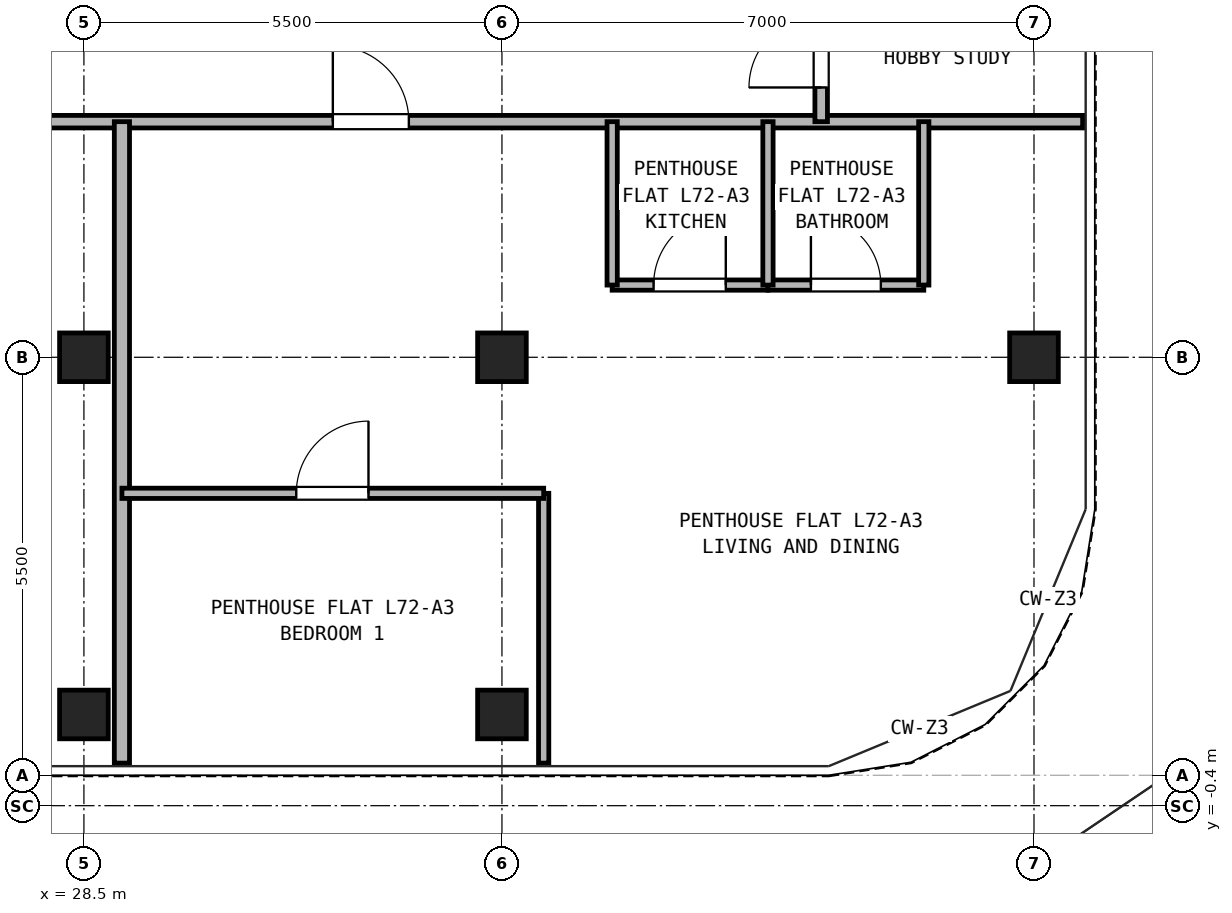
"""IFC4 building model, lengths in metres.
Left out: names, types, materials, properties, quantities, classifications, styles, units other than length and angle.
Written with IfcOpenShell. Run it as: python <this file> out.ifc"""

import sys

from ifc_helpers import new_model, si_unit, direction, frame, frame_2d, origin, origin_2d, place, context, subcontext, project, spatial, rectangle, hollow_rectangle, extrude, source, transform, mapped, element, fill, save


model = new_model("IFC4")
c1 = context("Model", 3, precision=1e-05, world=origin(), true_north=direction((0.0, 1.0)))
c2 = subcontext(c1, "Body", "Model", "MODEL_VIEW")
j1 = project(units=[si_unit("LENGTHUNIT", "METRE"), si_unit("PLANEANGLEUNIT", "RADIAN")], contexts=[c1])
p1 = place(None, origin())
s1 = spatial("IfcSite", under=j1, at=p1, CompositionType="ELEMENT")
p2 = place(p1, origin())
s2 = spatial("IfcBuilding", under=s1, at=p2, CompositionType="ELEMENT")
p3 = place(p2, frame((0.0, 0.0, 252.1)))
s3 = spatial("IfcBuildingStorey", under=s2, at=p3, CompositionType="ELEMENT", Elevation=252.1)
m1 = source(origin(), c2, "Body", "SweptSolid", [
    extrude(hollow_rectangle(XDim=0.64, YDim=0.64, WallThickness=0.035, at=origin_2d()), origin(), (0.0, 0.0, 1.0), 2.98),
])
for number, where, z_axis, x_axis in (
    (1, (28.5, 0.8, 0.0), (0.0, 0.0, 1.0), (1.0, 0.0, 0.0)),
    (2, (34.0, 0.8, 0.0), (0.0, 0.0, 1.0), (1.0, 0.0, 0.0)),
    (3, (41.0, 5.5, 0.0), (0.0, 0.0, 1.0), (1.0, 0.0, 0.0)),
    (4, (28.5, 5.5, 0.0), (0.0, 0.0, 1.0), (1.0, 0.0, 0.0)),
    (5, (34.0, 5.5, 0.0), (0.0, 0.0, 1.0), (1.0, 0.0, 0.0)),
):
    element("IfcColumn", number, at=place(p3, frame(where, z_axis=z_axis, x_axis=x_axis)), inside=s3, PredefinedType="COLUMN", context=c2, shape_type="MappedRepresentation", body=[
        mapped(m1, transform((0.0, 0.0, 0.0), x_axis=(1.0, 0.0, 0.0), y_axis=(0.0, 1.0, 0.0), z_axis=(0.0, 0.0, 1.0), scale=1.0)),
    ])
p4 = place(p3, frame((5.36, 8.6, 0.0), z_axis=(0.0, 0.0, 1.0), x_axis=(1.0, 0.0, 0.0)))
e6 = element("IfcWall", 6, at=p4, inside=s3, PredefinedType="PARTITIONING", context=c2, shape_type="SweptSolid", body=[
    extrude(rectangle(XDim=36.28, YDim=0.165, at=frame_2d((18.14, 0.0))), origin(), (0.0, 0.0, 1.0), 2.655),
])
p5 = place(p4, frame((8.365, 0.0, 0.0)))
e7 = element("IfcOpeningElement", 7, at=p5, cuts=e6, PredefinedType="OPENING", context=c2, shape_type="SweptSolid", body=[
    extrude(rectangle(XDim=1.0, YDim=2.15, at=frame_2d((0.5, 1.075))), frame((0.0, 0.093, 0.0), z_axis=(0.0, -1.0, 0.0), x_axis=(1.0, 0.0, 0.0)), (0.0, 0.0, 1.0), 0.185),
])
p6 = place(p4, frame((14.165, 0.0, 0.0)))
e8 = element("IfcOpeningElement", 8, at=p6, cuts=e6, PredefinedType="OPENING", context=c2, shape_type="SweptSolid", body=[
    extrude(rectangle(XDim=1.0, YDim=2.15, at=frame_2d((0.5, 1.075))), frame((0.0, 0.093, 0.0), z_axis=(0.0, -1.0, 0.0), x_axis=(1.0, 0.0, 0.0)), (0.0, 0.0, 1.0), 0.185),
])
p7 = place(p4, frame((26.415, 0.0, 0.0)))
e9 = element("IfcOpeningElement", 9, at=p7, cuts=e6, PredefinedType="OPENING", context=c2, shape_type="SweptSolid", body=[
    extrude(rectangle(XDim=1.0, YDim=2.15, at=frame_2d((0.5, 1.075))), frame((0.0, 0.093, 0.0), z_axis=(0.0, -1.0, 0.0), x_axis=(1.0, 0.0, 0.0)), (0.0, 0.0, 1.0), 0.185),
])
p8 = place(p3, frame((38.2, 8.6, 0.0), z_axis=(0.0, 0.0, 1.0), x_axis=(0.0, 1.0, 0.0)))
e10 = element("IfcWall", 10, at=p8, inside=s3, PredefinedType="PARTITIONING", context=c2, shape_type="SweptSolid", body=[
    extrude(rectangle(XDim=2.0, YDim=0.165, at=frame_2d((1.0, 0.0))), origin(), (0.0, 0.0, 1.0), 2.98),
])
p9 = place(p8, frame((0.45, 0.0, 0.0)))
e11 = element("IfcOpeningElement", 11, at=p9, cuts=e10, PredefinedType="OPENING", context=c2, shape_type="SweptSolid", body=[
    extrude(rectangle(XDim=0.95, YDim=2.15, at=frame_2d((0.475, 1.075))), frame((0.0, 0.093, 0.0), z_axis=(0.0, -1.0, 0.0), x_axis=(1.0, 0.0, 0.0)), (0.0, 0.0, 1.0), 0.185),
])
p10 = place(p3, frame((29.0, 0.16, 0.0), z_axis=(0.0, 0.0, 1.0), x_axis=(0.0, 1.0, 0.0)))
e12 = element("IfcWall", 12, at=p10, inside=s3, PredefinedType="PARTITIONING", context=c2, shape_type="SweptSolid", body=[
    extrude(rectangle(XDim=8.44, YDim=0.2, at=frame_2d((4.22, 0.0))), origin(), (0.0, 0.0, 1.0), 2.98),
])
p11 = place(p3, frame((35.45, 6.45, 0.0), z_axis=(0.0, 0.0, 1.0), x_axis=(1.0, 0.0, 0.0)))
e13 = element("IfcWall", 13, at=p11, inside=s3, PredefinedType="PARTITIONING", context=c2, shape_type="SweptSolid", body=[
    extrude(rectangle(XDim=2.05, YDim=0.135, at=frame_2d((1.025, 0.0))), origin(), (0.0, 0.0, 1.0), 2.98),
])
p12 = place(p11, frame((0.545, 0.0, 0.0)))
e14 = element("IfcOpeningElement", 14, at=p12, cuts=e13, PredefinedType="OPENING", context=c2, shape_type="SweptSolid", body=[
    extrude(rectangle(XDim=0.95, YDim=2.15, at=frame_2d((0.475, 1.075))), frame((0.0, 0.077, 0.0), z_axis=(0.0, -1.0, 0.0), x_axis=(1.0, 0.0, 0.0)), (0.0, 0.0, 1.0), 0.155),
])
p13 = place(p3, frame((37.5, 6.45, 0.0), z_axis=(0.0, 0.0, 1.0), x_axis=(1.0, 0.0, 0.0)))
e15 = element("IfcWall", 15, at=p13, inside=s3, PredefinedType="PARTITIONING", context=c2, shape_type="SweptSolid", body=[
    extrude(rectangle(XDim=2.05, YDim=0.135, at=frame_2d((1.025, 0.0))), origin(), (0.0, 0.0, 1.0), 2.98),
])
p14 = place(p13, frame((0.565, 0.0, 0.0)))
e16 = element("IfcOpeningElement", 16, at=p14, cuts=e15, PredefinedType="OPENING", context=c2, shape_type="SweptSolid", body=[
    extrude(rectangle(XDim=0.92, YDim=2.1, at=frame_2d((0.46, 1.05))), frame((0.0, 0.077, 0.0), z_axis=(0.0, -1.0, 0.0), x_axis=(1.0, 0.0, 0.0)), (0.0, 0.0, 1.0), 0.155),
])
for number, where, z_axis, x_axis in (
    (17, (35.45, 6.45, 0.0), (0.0, 0.0, 1.0), (0.0, 1.0, 0.0)),
    (18, (37.5, 6.45, 0.0), (0.0, 0.0, 1.0), (0.0, 1.0, 0.0)),
    (19, (39.55, 6.45, 0.0), (0.0, 0.0, 1.0), (0.0, 1.0, 0.0)),
):
    element("IfcWall", number, at=place(p3, frame(where, z_axis=z_axis, x_axis=x_axis)), inside=s3, PredefinedType="PARTITIONING", context=c2, shape_type="SweptSolid", body=[
        extrude(rectangle(XDim=2.15, YDim=0.135, at=frame_2d((1.075, 0.0))), origin(), (0.0, 0.0, 1.0), 2.98),
    ])
p15 = place(p3, frame((34.549, 0.16, 0.0), z_axis=(0.0, 0.0, 1.0), x_axis=(0.0, 1.0, 0.0)))
e20 = element("IfcWall", 20, at=p15, inside=s3, PredefinedType="PARTITIONING", context=c2, shape_type="SweptSolid", body=[
    extrude(rectangle(XDim=3.55, YDim=0.135, at=frame_2d((1.775, 0.0))), origin(), (0.0, 0.0, 1.0), 2.98),
])
p16 = place(p3, frame((29.0, 3.71, 0.0), z_axis=(0.0, 0.0, 1.0), x_axis=(1.0, 0.0, 0.0)))
e21 = element("IfcWall", 21, at=p16, inside=s3, PredefinedType="PARTITIONING", context=c2, shape_type="SweptSolid", body=[
    extrude(rectangle(XDim=5.549, YDim=0.135, at=frame_2d((2.774, 0.0))), origin(), (0.0, 0.0, 1.0), 2.98),
])
p17 = place(p16, frame((2.294, 0.0, 0.0)))
e22 = element("IfcOpeningElement", 22, at=p17, cuts=e21, PredefinedType="OPENING", context=c2, shape_type="SweptSolid", body=[
    extrude(rectangle(XDim=0.95, YDim=2.15, at=frame_2d((0.475, 1.075))), frame((0.0, 0.077, 0.0), z_axis=(0.0, -1.0, 0.0), x_axis=(1.0, 0.0, 0.0)), (0.0, 0.0, 1.0), 0.155),
])
p18 = place(p12, origin())
e23 = element("IfcDoor", 23, at=p18, inside=s3, OperationType="SINGLE_SWING_RIGHT", PredefinedType="DOOR", context=c2, shape_type="SweptSolid", body=[
    extrude(rectangle(XDim=0.95, YDim=2.15, at=frame_2d((0.475, 1.075))), frame((0.0, 0.025, 0.0), z_axis=(0.0, -1.0, 0.0), x_axis=(1.0, 0.0, 0.0)), (0.0, 0.0, 1.0), 0.05),
])
fill(e14, e23)
p19 = place(p14, origin())
e24 = element("IfcDoor", 24, at=p19, inside=s3, OperationType="SINGLE_SWING_LEFT", PredefinedType="DOOR", context=c2, shape_type="SweptSolid", body=[
    extrude(rectangle(XDim=0.92, YDim=2.1, at=frame_2d((0.46, 1.05))), frame((0.0, 0.025, 0.0), z_axis=(0.0, -1.0, 0.0), x_axis=(1.0, 0.0, 0.0)), (0.0, 0.0, 1.0), 0.05),
])
fill(e16, e24)
p20 = place(p17, frame((0.95, 0.0, 0.0), z_axis=(0.0, 0.0, 1.0), x_axis=(-1.0, 0.0, 0.0)))
e25 = element("IfcDoor", 25, at=p20, inside=s3, OperationType="SINGLE_SWING_RIGHT", PredefinedType="DOOR", context=c2, shape_type="SweptSolid", body=[
    extrude(rectangle(XDim=0.95, YDim=2.15, at=frame_2d((0.475, 1.075))), frame((0.0, 0.025, 0.0), z_axis=(0.0, -1.0, 0.0), x_axis=(1.0, 0.0, 0.0)), (0.0, 0.0, 1.0), 0.05),
])
fill(e22, e25)
p21 = place(p7, frame((1.0, 0.0, 0.0), z_axis=(0.0, 0.0, 1.0), x_axis=(-1.0, 0.0, 0.0)))
e26 = element("IfcDoor", 26, at=p21, inside=s3, OperationType="SINGLE_SWING_LEFT", PredefinedType="DOOR", context=c2, shape_type="SweptSolid", body=[
    extrude(rectangle(XDim=1.0, YDim=2.15, at=frame_2d((0.5, 1.075))), frame((0.0, 0.025, 0.0), z_axis=(0.0, -1.0, 0.0), x_axis=(1.0, 0.0, 0.0)), (0.0, 0.0, 1.0), 0.05),
])
fill(e9, e26)
p22 = place(p9, origin())
e27 = element("IfcDoor", 27, at=p22, inside=s3, OperationType="SINGLE_SWING_LEFT", PredefinedType="DOOR", context=c2, shape_type="SweptSolid", body=[
    extrude(rectangle(XDim=0.95, YDim=2.15, at=frame_2d((0.475, 1.075))), frame((0.0, 0.025, 0.0), z_axis=(0.0, -1.0, 0.0), x_axis=(1.0, 0.0, 0.0)), (0.0, 0.0, 1.0), 0.05),
])
fill(e11, e27)
save(model, sys.argv[1])
